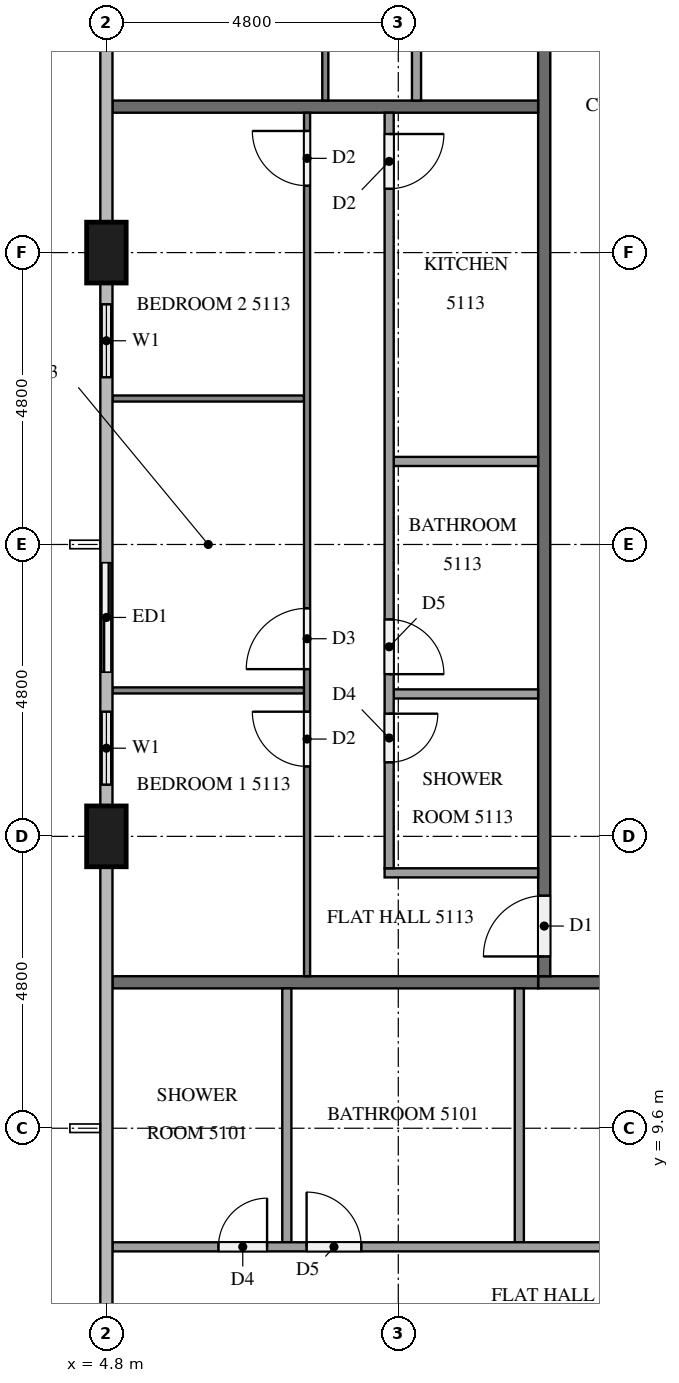
"""IFC4 building model, lengths in metres.
Left out: names, types, materials, properties, quantities, classifications, styles, units other than length and angle.
Written with IfcOpenShell. Run it as: python <this file> out.ifc"""

import sys

from ifc_helpers import new_model, si_unit, direction, frame, frame_2d, origin, origin_2d, place, context, subcontext, project, spatial, rectangle, extrude, element, fill, save


model = new_model("IFC4")
c1 = context("Model", 3, precision=1e-05, world=origin(), true_north=direction((0.0, 1.0)))
c2 = subcontext(c1, "Body", "Model", "MODEL_VIEW")
j1 = project(units=[si_unit("LENGTHUNIT", "METRE"), si_unit("PLANEANGLEUNIT", "RADIAN")], contexts=[c1])
p1 = place(None, origin())
s1 = spatial("IfcSite", under=j1, at=p1, CompositionType="ELEMENT")
p2 = place(p1, origin())
s2 = spatial("IfcBuilding", under=s1, at=p2, CompositionType="ELEMENT")
p3 = place(p2, frame((0.0, 0.0, 196.4)))
s3 = spatial("IfcBuildingStorey", under=s2, at=p3, CompositionType="ELEMENT", Elevation=196.4)
for number, where, z_axis, x_axis in (
    (1, (4.8, 24.0, 0.0), (0.0, 0.0, 1.0), (0.0, 1.0, 0.0)),
    (2, (4.8, 14.4, 0.0), (0.0, 0.0, 1.0), (0.0, 1.0, 0.0)),
):
    element("IfcColumn", number, at=place(p3, frame(where, z_axis=z_axis, x_axis=x_axis)), inside=s3, PredefinedType="COLUMN", context=c2, shape_type="SweptSolid", body=[
        extrude(rectangle(XDim=1.0, YDim=0.65, at=origin_2d()), origin(), (0.0, 0.0, 1.0), 3.2),
    ])
p4 = place(p3, frame((4.8, 23.5, 0.0), z_axis=(0.0, 0.0, 1.0), x_axis=(0.0, -1.0, 0.0)))
e3 = element("IfcWall", 3, at=p4, inside=s3, PredefinedType="SOLIDWALL", context=c2, shape_type="SweptSolid", body=[
    extrude(rectangle(XDim=1.9, YDim=0.15, at=frame_2d((0.95, 0.0))), origin(), (0.0, 0.0, 1.0), 3.2),
])
p5 = place(p4, frame((0.35, 0.0, 0.9)))
e4 = element("IfcOpeningElement", 4, at=p5, cuts=e3, PredefinedType="OPENING", context=c2, shape_type="SweptSolid", body=[
    extrude(rectangle(XDim=1.2, YDim=1.4, at=frame_2d((0.6, 0.7))), frame((0.0, 0.085, 0.0), z_axis=(0.0, -1.0, 0.0), x_axis=(1.0, 0.0, 0.0)), (0.0, 0.0, 1.0), 0.17),
])
p6 = place(p3, frame((4.8, 19.2, 0.0), z_axis=(0.0, 0.0, 1.0), x_axis=(0.0, -1.0, 0.0)))
e5 = element("IfcWall", 5, at=p6, inside=s3, PredefinedType="SOLIDWALL", context=c2, shape_type="SweptSolid", body=[
    extrude(rectangle(XDim=4.3, YDim=0.15, at=frame_2d((2.15, 0.0))), origin(), (0.0, 0.0, 1.0), 3.2),
])
p7 = place(p6, frame((0.3, 0.0, 0.0)))
e6 = element("IfcOpeningElement", 6, at=p7, cuts=e5, PredefinedType="OPENING", context=c2, shape_type="SweptSolid", body=[
    extrude(rectangle(XDim=1.8, YDim=2.4, at=frame_2d((0.9, 1.2))), frame((0.0, 0.085, 0.0), z_axis=(0.0, -1.0, 0.0), x_axis=(1.0, 0.0, 0.0)), (0.0, 0.0, 1.0), 0.17),
])
p8 = place(p6, frame((2.75, 0.0, 0.9)))
e7 = element("IfcOpeningElement", 7, at=p8, cuts=e5, PredefinedType="OPENING", context=c2, shape_type="SweptSolid", body=[
    extrude(rectangle(XDim=1.2, YDim=1.4, at=frame_2d((0.6, 0.7))), frame((0.0, 0.085, 0.0), z_axis=(0.0, -1.0, 0.0), x_axis=(1.0, 0.0, 0.0)), (0.0, 0.0, 1.0), 0.17),
])
p9 = place(p3, frame((50.5, 12.0, 0.0), z_axis=(0.0, 0.0, 1.0), x_axis=(-1.0, 0.0, 0.0)))
e8 = element("IfcWall", 8, at=p9, inside=s3, PredefinedType="PARTITIONING", context=c2, shape_type="SweptSolid", body=[
    extrude(rectangle(XDim=38.6, YDim=0.2, at=frame_2d((19.3, 0.0))), origin(), (0.0, 0.0, 1.0), 3.2),
])
p10 = place(p9, frame((31.725, 0.0, 0.0)))
e9 = element("IfcOpeningElement", 9, at=p10, cuts=e8, PredefinedType="OPENING", context=c2, shape_type="SweptSolid", body=[
    extrude(rectangle(XDim=1.0, YDim=2.1, at=frame_2d((0.5, 1.05))), frame((0.0, 0.11, 0.0), z_axis=(0.0, -1.0, 0.0), x_axis=(1.0, 0.0, 0.0)), (0.0, 0.0, 1.0), 0.22),
])
p11 = place(p9, frame((19.725, 0.0, 0.0)))
e10 = element("IfcOpeningElement", 10, at=p11, cuts=e8, PredefinedType="OPENING", context=c2, shape_type="SweptSolid", body=[
    extrude(rectangle(XDim=1.0, YDim=2.1, at=frame_2d((0.5, 1.05))), frame((0.0, 0.11, 0.0), z_axis=(0.0, -1.0, 0.0), x_axis=(1.0, 0.0, 0.0)), (0.0, 0.0, 1.0), 0.22),
])
p12 = place(p9, frame((17.875, 0.0, 0.0)))
e11 = element("IfcOpeningElement", 11, at=p12, cuts=e8, PredefinedType="OPENING", context=c2, shape_type="SweptSolid", body=[
    extrude(rectangle(XDim=1.0, YDim=2.1, at=frame_2d((0.5, 1.05))), frame((0.0, 0.11, 0.0), z_axis=(0.0, -1.0, 0.0), x_axis=(1.0, 0.0, 0.0)), (0.0, 0.0, 1.0), 0.22),
])
p13 = place(p9, frame((3.475, 0.0, 0.0)))
e12 = element("IfcOpeningElement", 12, at=p13, cuts=e8, PredefinedType="OPENING", context=c2, shape_type="SweptSolid", body=[
    extrude(rectangle(XDim=1.0, YDim=2.1, at=frame_2d((0.5, 1.05))), frame((0.0, 0.11, 0.0), z_axis=(0.0, -1.0, 0.0), x_axis=(1.0, 0.0, 0.0)), (0.0, 0.0, 1.0), 0.22),
])
p14 = place(p3, frame((12.0, 12.1, 0.0), z_axis=(0.0, 0.0, 1.0), x_axis=(0.0, 1.0, 0.0)))
e13 = element("IfcWall", 13, at=p14, inside=s3, PredefinedType="PARTITIONING", context=c2, shape_type="SweptSolid", body=[
    extrude(rectangle(XDim=28.6, YDim=0.2, at=frame_2d((14.3, 0.0))), origin(), (0.0, 0.0, 1.0), 3.2),
])
p15 = place(p14, frame((27.275, 0.0, 0.0)))
e14 = element("IfcOpeningElement", 14, at=p15, cuts=e13, PredefinedType="OPENING", context=c2, shape_type="SweptSolid", body=[
    extrude(rectangle(XDim=1.0, YDim=2.1, at=frame_2d((0.5, 1.05))), frame((0.0, 0.11, 0.0), z_axis=(0.0, -1.0, 0.0), x_axis=(1.0, 0.0, 0.0)), (0.0, 0.0, 1.0), 0.22),
])
p16 = place(p14, frame((0.325, 0.0, 0.0)))
e15 = element("IfcOpeningElement", 15, at=p16, cuts=e13, PredefinedType="OPENING", context=c2, shape_type="SweptSolid", body=[
    extrude(rectangle(XDim=1.0, YDim=2.1, at=frame_2d((0.5, 1.05))), frame((0.0, 0.11, 0.0), z_axis=(0.0, -1.0, 0.0), x_axis=(1.0, 0.0, 0.0)), (0.0, 0.0, 1.0), 0.22),
])
for number, where, z_axis, x_axis in (
    (16, (4.9, 12.0, 0.0), (0.0, 0.0, 1.0), (1.0, 0.0, 0.0)),
    (17, (4.9, 26.4, 0.0), (0.0, 0.0, 1.0), (1.0, 0.0, 0.0)),
):
    element("IfcWall", number, at=place(p3, frame(where, z_axis=z_axis, x_axis=x_axis)), inside=s3, PredefinedType="PARTITIONING", context=c2, shape_type="SweptSolid", body=[
        extrude(rectangle(XDim=7.0, YDim=0.2, at=frame_2d((3.5, 0.0))), origin(), (0.0, 0.0, 1.0), 3.2),
    ])
for number, where, z_axis, x_axis in (
    (18, (11.59, 11.9, 0.0), (0.0, 0.0, 1.0), (0.0, -1.0, 0.0)),
    (19, (7.767, 11.9, 0.0), (0.0, 0.0, 1.0), (0.0, -1.0, 0.0)),
):
    element("IfcWall", number, at=place(p3, frame(where, z_axis=z_axis, x_axis=x_axis)), inside=s3, PredefinedType="PARTITIONING", context=c2, shape_type="SweptSolid", body=[
        extrude(rectangle(XDim=4.175, YDim=0.15, at=frame_2d((2.087, 0.0))), origin(), (0.0, 0.0, 1.0), 3.2),
    ])
p17 = place(p3, frame((4.9, 7.65, 0.0), z_axis=(0.0, 0.0, 1.0), x_axis=(1.0, 0.0, 0.0)))
e20 = element("IfcWall", 20, at=p17, inside=s3, PredefinedType="PARTITIONING", context=c2, shape_type="SweptSolid", body=[
    extrude(rectangle(XDim=12.425, YDim=0.15, at=frame_2d((6.212, 0.0))), origin(), (0.0, 0.0, 1.0), 3.2),
])
p18 = place(p17, frame((11.225, 0.0, 0.0)))
e21 = element("IfcOpeningElement", 21, at=p18, cuts=e20, PredefinedType="OPENING", context=c2, shape_type="SweptSolid", body=[
    extrude(rectangle(XDim=0.9, YDim=2.1, at=frame_2d((0.45, 1.05))), frame((0.0, 0.085, 0.0), z_axis=(0.0, -1.0, 0.0), x_axis=(1.0, 0.0, 0.0)), (0.0, 0.0, 1.0), 0.17),
])
p19 = place(p17, frame((3.192, 0.0, 0.0)))
e22 = element("IfcOpeningElement", 22, at=p19, cuts=e20, PredefinedType="OPENING", context=c2, shape_type="SweptSolid", body=[
    extrude(rectangle(XDim=0.9, YDim=2.1, at=frame_2d((0.45, 1.05))), frame((0.0, 0.085, 0.0), z_axis=(0.0, -1.0, 0.0), x_axis=(1.0, 0.0, 0.0)), (0.0, 0.0, 1.0), 0.17),
])
p20 = place(p17, frame((1.742, 0.0, 0.0)))
e23 = element("IfcOpeningElement", 23, at=p20, cuts=e20, PredefinedType="OPENING", context=c2, shape_type="SweptSolid", body=[
    extrude(rectangle(XDim=0.8, YDim=2.1, at=frame_2d((0.4, 1.05))), frame((0.0, 0.085, 0.0), z_axis=(0.0, -1.0, 0.0), x_axis=(1.0, 0.0, 0.0)), (0.0, 0.0, 1.0), 0.17),
])
p21 = place(p3, frame((8.4, 26.5, 0.0), z_axis=(0.0, 0.0, 1.0), x_axis=(0.0, 1.0, 0.0)))
e24 = element("IfcWall", 24, at=p21, inside=s3, PredefinedType="PARTITIONING", context=c2, shape_type="SweptSolid", body=[
    extrude(rectangle(XDim=14.2, YDim=0.1, at=frame_2d((7.1, 0.0))), origin(), (0.0, 0.0, 1.0), 3.2),
])
p22 = place(p21, frame((12.9, 0.0, 0.0)))
e25 = element("IfcOpeningElement", 25, at=p22, cuts=e24, PredefinedType="OPENING", context=c2, shape_type="SweptSolid", body=[
    extrude(rectangle(XDim=1.0, YDim=2.1, at=frame_2d((0.5, 1.05))), frame((0.0, 0.06, 0.0), z_axis=(0.0, -1.0, 0.0), x_axis=(1.0, 0.0, 0.0)), (0.0, 0.0, 1.0), 0.12),
])
p23 = place(p21, frame((5.05, 0.0, 0.0)))
e26 = element("IfcOpeningElement", 26, at=p23, cuts=e24, PredefinedType="OPENING", context=c2, shape_type="SweptSolid", body=[
    extrude(rectangle(XDim=0.9, YDim=2.1, at=frame_2d((0.45, 1.05))), frame((0.0, 0.06, 0.0), z_axis=(0.0, -1.0, 0.0), x_axis=(1.0, 0.0, 0.0)), (0.0, 0.0, 1.0), 0.12),
])
p24 = place(p21, frame((3.45, 0.0, 0.0)))
e27 = element("IfcOpeningElement", 27, at=p24, cuts=e24, PredefinedType="OPENING", context=c2, shape_type="SweptSolid", body=[
    extrude(rectangle(XDim=0.9, YDim=2.1, at=frame_2d((0.45, 1.05))), frame((0.0, 0.06, 0.0), z_axis=(0.0, -1.0, 0.0), x_axis=(1.0, 0.0, 0.0)), (0.0, 0.0, 1.0), 0.12),
])
p25 = place(p3, frame((9.9, 38.925, 0.0), z_axis=(0.0, 0.0, 1.0), x_axis=(0.0, -1.0, 0.0)))
e28 = element("IfcWall", 28, at=p25, inside=s3, PredefinedType="PARTITIONING", context=c2, shape_type="SweptSolid", body=[
    extrude(rectangle(XDim=12.425, YDim=0.15, at=frame_2d((6.212, 0.0))), origin(), (0.0, 0.0, 1.0), 3.2),
])
p26 = place(p25, frame((0.3, 0.0, 0.0)))
e29 = element("IfcOpeningElement", 29, at=p26, cuts=e28, PredefinedType="OPENING", context=c2, shape_type="SweptSolid", body=[
    extrude(rectangle(XDim=0.8, YDim=2.1, at=frame_2d((0.4, 1.05))), frame((0.0, 0.085, 0.0), z_axis=(0.0, -1.0, 0.0), x_axis=(1.0, 0.0, 0.0)), (0.0, 0.0, 1.0), 0.17),
])
p27 = place(p25, frame((5.465, 0.0, 0.0)))
e30 = element("IfcOpeningElement", 30, at=p27, cuts=e28, PredefinedType="OPENING", context=c2, shape_type="SweptSolid", body=[
    extrude(rectangle(XDim=0.9, YDim=2.1, at=frame_2d((0.45, 1.05))), frame((0.0, 0.085, 0.0), z_axis=(0.0, -1.0, 0.0), x_axis=(1.0, 0.0, 0.0)), (0.0, 0.0, 1.0), 0.17),
])
p28 = place(p25, frame((7.015, 0.0, 0.0)))
e31 = element("IfcOpeningElement", 31, at=p28, cuts=e28, PredefinedType="OPENING", context=c2, shape_type="SweptSolid", body=[
    extrude(rectangle(XDim=0.9, YDim=2.1, at=frame_2d((0.45, 1.05))), frame((0.0, 0.085, 0.0), z_axis=(0.0, -1.0, 0.0), x_axis=(1.0, 0.0, 0.0)), (0.0, 0.0, 1.0), 0.17),
])
for number, where, z_axis, x_axis in (
    (32, (8.05, 16.8, 0.0), (0.0, 0.0, 1.0), (-1.0, 0.0, 0.0)),
    (33, (8.05, 21.6, 0.0), (0.0, 0.0, 1.0), (-1.0, 0.0, 0.0)),
):
    element("IfcWall", number, at=place(p3, frame(where, z_axis=z_axis, x_axis=x_axis)), inside=s3, PredefinedType="PARTITIONING", context=c2, shape_type="SweptSolid", body=[
        extrude(rectangle(XDim=3.15, YDim=0.1, at=frame_2d((1.575, 0.0))), origin(), (0.0, 0.0, 1.0), 3.2),
    ])
p29 = place(p3, frame((8.1, 12.1, 0.0), z_axis=(0.0, 0.0, 1.0), x_axis=(0.0, 1.0, 0.0)))
e34 = element("IfcWall", 34, at=p29, inside=s3, PredefinedType="PARTITIONING", context=c2, shape_type="SweptSolid", body=[
    extrude(rectangle(XDim=14.2, YDim=0.1, at=frame_2d((7.1, 0.0))), origin(), (0.0, 0.0, 1.0), 3.2),
])
p30 = place(p29, frame((3.45, 0.0, 0.0)))
e35 = element("IfcOpeningElement", 35, at=p30, cuts=e34, PredefinedType="OPENING", context=c2, shape_type="SweptSolid", body=[
    extrude(rectangle(XDim=0.9, YDim=2.1, at=frame_2d((0.45, 1.05))), frame((0.0, 0.06, 0.0), z_axis=(0.0, -1.0, 0.0), x_axis=(1.0, 0.0, 0.0)), (0.0, 0.0, 1.0), 0.12),
])
p31 = place(p29, frame((5.05, 0.0, 0.0)))
e36 = element("IfcOpeningElement", 36, at=p31, cuts=e34, PredefinedType="OPENING", context=c2, shape_type="SweptSolid", body=[
    extrude(rectangle(XDim=1.0, YDim=2.1, at=frame_2d((0.5, 1.05))), frame((0.0, 0.06, 0.0), z_axis=(0.0, -1.0, 0.0), x_axis=(1.0, 0.0, 0.0)), (0.0, 0.0, 1.0), 0.12),
])
p32 = place(p29, frame((13.0, 0.0, 0.0)))
e37 = element("IfcOpeningElement", 37, at=p32, cuts=e34, PredefinedType="OPENING", context=c2, shape_type="SweptSolid", body=[
    extrude(rectangle(XDim=0.9, YDim=2.1, at=frame_2d((0.45, 1.05))), frame((0.0, 0.06, 0.0), z_axis=(0.0, -1.0, 0.0), x_axis=(1.0, 0.0, 0.0)), (0.0, 0.0, 1.0), 0.12),
])
for number, where, z_axis, x_axis in (
    (38, (11.9, 16.742, 0.0), (0.0, 0.0, 1.0), (-1.0, 0.0, 0.0)),
    (39, (11.9, 20.565, 0.0), (0.0, 0.0, 1.0), (-1.0, 0.0, 0.0)),
):
    element("IfcWall", number, at=place(p3, frame(where, z_axis=z_axis, x_axis=x_axis)), inside=s3, PredefinedType="PARTITIONING", context=c2, shape_type="SweptSolid", body=[
        extrude(rectangle(XDim=2.375, YDim=0.15, at=frame_2d((1.188, 0.0))), origin(), (0.0, 0.0, 1.0), 3.2),
    ])
p33 = place(p3, frame((11.9, 13.8, 0.0), z_axis=(0.0, 0.0, 1.0), x_axis=(-1.0, 0.0, 0.0)))
e40 = element("IfcWall", 40, at=p33, inside=s3, PredefinedType="PARTITIONING", context=c2, shape_type="SweptSolid", body=[
    extrude(rectangle(XDim=2.525, YDim=0.15, at=frame_2d((1.262, 0.0))), origin(), (0.0, 0.0, 1.0), 3.2),
])
p34 = place(p3, frame((9.45, 26.3, 0.0), z_axis=(0.0, 0.0, 1.0), x_axis=(0.0, -1.0, 0.0)))
e41 = element("IfcWall", 41, at=p34, inside=s3, PredefinedType="PARTITIONING", context=c2, shape_type="SweptSolid", body=[
    extrude(rectangle(XDim=12.425, YDim=0.15, at=frame_2d((6.212, 0.0))), origin(), (0.0, 0.0, 1.0), 3.2),
])
p35 = place(p34, frame((9.883, 0.0, 0.0)))
e42 = element("IfcOpeningElement", 42, at=p35, cuts=e41, PredefinedType="OPENING", context=c2, shape_type="SweptSolid", body=[
    extrude(rectangle(XDim=0.8, YDim=2.1, at=frame_2d((0.4, 1.05))), frame((0.0, 0.085, 0.0), z_axis=(0.0, -1.0, 0.0), x_axis=(1.0, 0.0, 0.0)), (0.0, 0.0, 1.0), 0.17),
])
p36 = place(p34, frame((8.333, 0.0, 0.0)))
e43 = element("IfcOpeningElement", 43, at=p36, cuts=e41, PredefinedType="OPENING", context=c2, shape_type="SweptSolid", body=[
    extrude(rectangle(XDim=0.9, YDim=2.1, at=frame_2d((0.45, 1.05))), frame((0.0, 0.085, 0.0), z_axis=(0.0, -1.0, 0.0), x_axis=(1.0, 0.0, 0.0)), (0.0, 0.0, 1.0), 0.17),
])
p37 = place(p34, frame((0.35, 0.0, 0.0)))
e44 = element("IfcOpeningElement", 44, at=p37, cuts=e41, PredefinedType="OPENING", context=c2, shape_type="SweptSolid", body=[
    extrude(rectangle(XDim=0.9, YDim=2.1, at=frame_2d((0.45, 1.05))), frame((0.0, 0.085, 0.0), z_axis=(0.0, -1.0, 0.0), x_axis=(1.0, 0.0, 0.0)), (0.0, 0.0, 1.0), 0.17),
])
p38 = place(p5, origin())
e45 = element("IfcWindow", 45, at=p38, inside=s3, PartitioningType="SINGLE_PANEL", PredefinedType="WINDOW", context=c2, shape_type="SweptSolid", body=[
    extrude(rectangle(XDim=1.2, YDim=1.4, at=frame_2d((0.6, 0.7))), frame((0.0, 0.03, 0.0), z_axis=(0.0, -1.0, 0.0), x_axis=(1.0, 0.0, 0.0)), (0.0, 0.0, 1.0), 0.06),
])
fill(e4, e45)
p39 = place(p7, origin())
e46 = element("IfcDoor", 46, at=p39, inside=s3, OperationType="SLIDING_TO_LEFT", PredefinedType="DOOR", context=c2, shape_type="SweptSolid", body=[
    extrude(rectangle(XDim=1.8, YDim=2.4, at=frame_2d((0.9, 1.2))), frame((0.0, 0.025, 0.0), z_axis=(0.0, -1.0, 0.0), x_axis=(1.0, 0.0, 0.0)), (0.0, 0.0, 1.0), 0.05),
])
fill(e6, e46)
p40 = place(p8, origin())
e47 = element("IfcWindow", 47, at=p40, inside=s3, PartitioningType="SINGLE_PANEL", PredefinedType="WINDOW", context=c2, shape_type="SweptSolid", body=[
    extrude(rectangle(XDim=1.2, YDim=1.4, at=frame_2d((0.6, 0.7))), frame((0.0, 0.03, 0.0), z_axis=(0.0, -1.0, 0.0), x_axis=(1.0, 0.0, 0.0)), (0.0, 0.0, 1.0), 0.06),
])
fill(e7, e47)
p41 = place(p16, origin())
e48 = element("IfcDoor", 48, at=p41, inside=s3, OperationType="SINGLE_SWING_LEFT", PredefinedType="DOOR", context=c2, shape_type="SweptSolid", body=[
    extrude(rectangle(XDim=1.0, YDim=2.1, at=frame_2d((0.5, 1.05))), frame((0.0, 0.025, 0.0), z_axis=(0.0, -1.0, 0.0), x_axis=(1.0, 0.0, 0.0)), (0.0, 0.0, 1.0), 0.05),
])
fill(e15, e48)
p42 = place(p19, origin())
e49 = element("IfcDoor", 49, at=p42, inside=s3, OperationType="SINGLE_SWING_LEFT", PredefinedType="DOOR", context=c2, shape_type="SweptSolid", body=[
    extrude(rectangle(XDim=0.9, YDim=2.1, at=frame_2d((0.45, 1.05))), frame((0.0, 0.025, 0.0), z_axis=(0.0, -1.0, 0.0), x_axis=(1.0, 0.0, 0.0)), (0.0, 0.0, 1.0), 0.05),
])
fill(e22, e49)
p43 = place(p20, origin())
e50 = element("IfcDoor", 50, at=p43, inside=s3, OperationType="SINGLE_SWING_RIGHT", PredefinedType="DOOR", context=c2, shape_type="SweptSolid", body=[
    extrude(rectangle(XDim=0.8, YDim=2.1, at=frame_2d((0.4, 1.05))), frame((0.0, 0.025, 0.0), z_axis=(0.0, -1.0, 0.0), x_axis=(1.0, 0.0, 0.0)), (0.0, 0.0, 1.0), 0.05),
])
fill(e23, e50)
p44 = place(p30, origin())
e51 = element("IfcDoor", 51, at=p44, inside=s3, OperationType="SINGLE_SWING_RIGHT", PredefinedType="DOOR", context=c2, shape_type="SweptSolid", body=[
    extrude(rectangle(XDim=0.9, YDim=2.1, at=frame_2d((0.45, 1.05))), frame((0.0, 0.025, 0.0), z_axis=(0.0, -1.0, 0.0), x_axis=(1.0, 0.0, 0.0)), (0.0, 0.0, 1.0), 0.05),
])
fill(e35, e51)
p45 = place(p31, origin())
e52 = element("IfcDoor", 52, at=p45, inside=s3, OperationType="SINGLE_SWING_LEFT", PredefinedType="DOOR", context=c2, shape_type="SweptSolid", body=[
    extrude(rectangle(XDim=1.0, YDim=2.1, at=frame_2d((0.5, 1.05))), frame((0.0, 0.025, 0.0), z_axis=(0.0, -1.0, 0.0), x_axis=(1.0, 0.0, 0.0)), (0.0, 0.0, 1.0), 0.05),
])
fill(e36, e52)
p46 = place(p32, origin())
e53 = element("IfcDoor", 53, at=p46, inside=s3, OperationType="SINGLE_SWING_RIGHT", PredefinedType="DOOR", context=c2, shape_type="SweptSolid", body=[
    extrude(rectangle(XDim=0.9, YDim=2.1, at=frame_2d((0.45, 1.05))), frame((0.0, 0.025, 0.0), z_axis=(0.0, -1.0, 0.0), x_axis=(1.0, 0.0, 0.0)), (0.0, 0.0, 1.0), 0.05),
])
fill(e37, e53)
p47 = place(p35, origin())
e54 = element("IfcDoor", 54, at=p47, inside=s3, OperationType="SINGLE_SWING_LEFT", PredefinedType="DOOR", context=c2, shape_type="SweptSolid", body=[
    extrude(rectangle(XDim=0.8, YDim=2.1, at=frame_2d((0.4, 1.05))), frame((0.0, 0.025, 0.0), z_axis=(0.0, -1.0, 0.0), x_axis=(1.0, 0.0, 0.0)), (0.0, 0.0, 1.0), 0.05),
])
fill(e42, e54)
p48 = place(p36, origin())
e55 = element("IfcDoor", 55, at=p48, inside=s3, OperationType="SINGLE_SWING_RIGHT", PredefinedType="DOOR", context=c2, shape_type="SweptSolid", body=[
    extrude(rectangle(XDim=0.9, YDim=2.1, at=frame_2d((0.45, 1.05))), frame((0.0, 0.025, 0.0), z_axis=(0.0, -1.0, 0.0), x_axis=(1.0, 0.0, 0.0)), (0.0, 0.0, 1.0), 0.05),
])
fill(e43, e55)
p49 = place(p37, origin())
e56 = element("IfcDoor", 56, at=p49, inside=s3, OperationType="SINGLE_SWING_LEFT", PredefinedType="DOOR", context=c2, shape_type="SweptSolid", body=[
    extrude(rectangle(XDim=0.9, YDim=2.1, at=frame_2d((0.45, 1.05))), frame((0.0, 0.025, 0.0), z_axis=(0.0, -1.0, 0.0), x_axis=(1.0, 0.0, 0.0)), (0.0, 0.0, 1.0), 0.05),
])
fill(e44, e56)
save(model, sys.argv[1])
